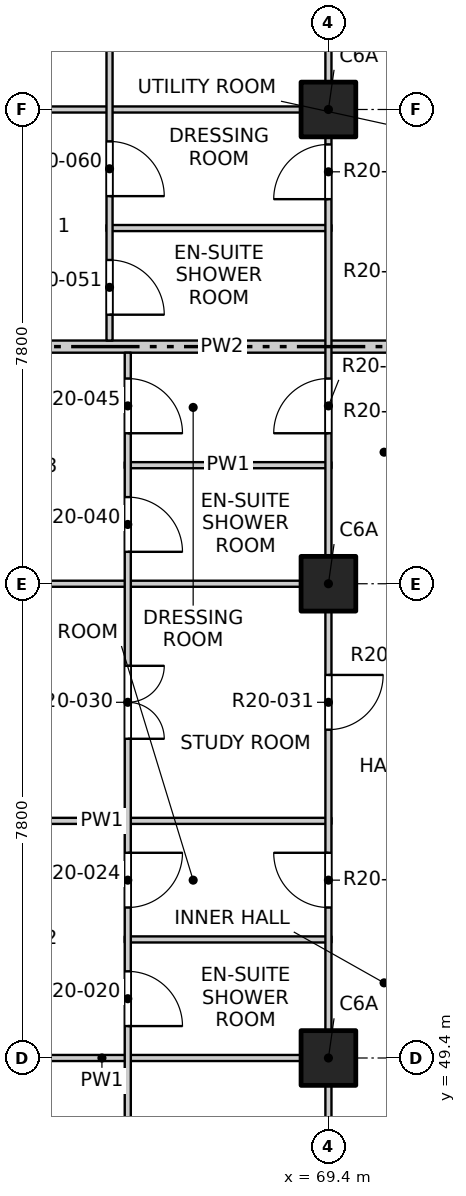
"""IFC4 building model, lengths in metres.
Left out: names, types, materials, properties, quantities, classifications, styles, units other than length and angle.
Written with IfcOpenShell. Run it as: python <this file> out.ifc"""

import sys

from ifc_helpers import new_model, si_unit, direction, frame, frame_2d, origin, origin_2d, place, context, subcontext, project, spatial, rectangle, extrude, element, fill, save


model = new_model("IFC4")
c1 = context("Model", 3, precision=1e-05, world=origin(), true_north=direction((0.0, 1.0)))
c2 = subcontext(c1, "Body", "Model", "MODEL_VIEW")
j1 = project(units=[si_unit("LENGTHUNIT", "METRE"), si_unit("PLANEANGLEUNIT", "RADIAN")], contexts=[c1])
p1 = place(None, origin())
s1 = spatial("IfcSite", under=j1, at=p1, CompositionType="ELEMENT")
p2 = place(p1, origin())
s2 = spatial("IfcBuilding", under=s1, at=p2, CompositionType="ELEMENT")
p3 = place(p2, frame((0.0, 0.0, 204.1)))
s3 = spatial("IfcBuildingStorey", under=s2, at=p3, CompositionType="ELEMENT", Elevation=204.1)
for number, where, z_axis, x_axis in (
    (1, (69.4, 49.4, -0.25), (0.0, 0.0, 1.0), (1.0, 0.0, 0.0)),
    (2, (69.4, 57.2, -0.25), (0.0, 0.0, 1.0), (1.0, 0.0, 0.0)),
    (3, (69.4, 65.0, -0.25), (0.0, 0.0, 1.0), (1.0, 0.0, 0.0)),
):
    element("IfcColumn", number, at=place(p3, frame(where, z_axis=z_axis, x_axis=x_axis)), inside=s3, PredefinedType="COLUMN", context=c2, shape_type="SweptSolid", body=[
        extrude(rectangle(XDim=0.9, YDim=0.9, at=origin_2d()), origin(), (0.0, 0.0, 1.0), 3.4),
    ])
p4 = place(p3, frame((61.9, 49.4, 0.0), z_axis=(0.0, 0.0, 1.0), x_axis=(1.0, 0.0, 0.0)))
e4 = element("IfcWall", 4, at=p4, inside=s3, PredefinedType="PARTITIONING", context=c2, shape_type="SweptSolid", body=[
    extrude(rectangle(XDim=7.55, YDim=0.1, at=frame_2d((3.775, 0.0))), origin(), (0.0, 0.0, 1.0), 3.15),
])
p5 = place(p3, frame((66.05, 51.35, 0.0), z_axis=(0.0, 0.0, 1.0), x_axis=(1.0, 0.0, 0.0)))
e5 = element("IfcWall", 5, at=p5, inside=s3, PredefinedType="PARTITIONING", context=c2, shape_type="SweptSolid", body=[
    extrude(rectangle(XDim=3.4, YDim=0.1, at=frame_2d((1.7, 0.0))), origin(), (0.0, 0.0, 1.0), 3.15),
])
for number, where, z_axis, x_axis in (
    (6, (61.9, 53.3, 0.0), (0.0, 0.0, 1.0), (1.0, 0.0, 0.0)),
    (7, (61.9, 57.2, 0.0), (0.0, 0.0, 1.0), (1.0, 0.0, 0.0)),
):
    element("IfcWall", number, at=place(p3, frame(where, z_axis=z_axis, x_axis=x_axis)), inside=s3, PredefinedType="PARTITIONING", context=c2, shape_type="SweptSolid", body=[
        extrude(rectangle(XDim=7.55, YDim=0.1, at=frame_2d((3.775, 0.0))), origin(), (0.0, 0.0, 1.0), 3.15),
    ])
p6 = place(p3, frame((66.05, 59.15, 0.0), z_axis=(0.0, 0.0, 1.0), x_axis=(1.0, 0.0, 0.0)))
e8 = element("IfcWall", 8, at=p6, inside=s3, PredefinedType="PARTITIONING", context=c2, shape_type="SweptSolid", body=[
    extrude(rectangle(XDim=3.4, YDim=0.1, at=frame_2d((1.7, 0.0))), origin(), (0.0, 0.0, 1.0), 3.15),
])
p7 = place(p3, frame((61.9, 61.1, 0.0), z_axis=(0.0, 0.0, 1.0), x_axis=(1.0, 0.0, 0.0)))
e9 = element("IfcWall", 9, at=p7, inside=s3, PredefinedType="PARTITIONING", context=c2, shape_type="SweptSolid", body=[
    extrude(rectangle(XDim=11.5, YDim=0.2, at=frame_2d((5.75, 0.0))), origin(), (0.0, 0.0, 1.0), 2.55),
])
p8 = place(p3, frame((65.75, 63.05, 0.0), z_axis=(0.0, 0.0, 1.0), x_axis=(1.0, 0.0, 0.0)))
e10 = element("IfcWall", 10, at=p8, inside=s3, PredefinedType="PARTITIONING", context=c2, shape_type="SweptSolid", body=[
    extrude(rectangle(XDim=3.7, YDim=0.1, at=frame_2d((1.85, 0.0))), origin(), (0.0, 0.0, 1.0), 3.15),
])
p9 = place(p3, frame((61.9, 65.0, 0.0), z_axis=(0.0, 0.0, 1.0), x_axis=(1.0, 0.0, 0.0)))
e11 = element("IfcWall", 11, at=p9, inside=s3, PredefinedType="PARTITIONING", context=c2, shape_type="SweptSolid", body=[
    extrude(rectangle(XDim=7.55, YDim=0.1, at=frame_2d((3.775, 0.0))), origin(), (0.0, 0.0, 1.0), 3.15),
])
p10 = place(p3, frame((65.8, 61.2, 0.0), z_axis=(0.0, 0.0, 1.0), x_axis=(0.0, 1.0, 0.0)))
e12 = element("IfcWall", 12, at=p10, inside=s3, PredefinedType="PARTITIONING", context=c2, shape_type="SweptSolid", body=[
    extrude(rectangle(XDim=26.9, YDim=0.1, at=frame_2d((13.45, 0.0))), origin(), (0.0, 0.0, 1.0), 3.15),
])
p11 = place(p10, frame((0.425, 0.0, 0.0)))
e13 = element("IfcOpeningElement", 13, at=p11, cuts=e12, PredefinedType="OPENING", context=c2, shape_type="SweptSolid", body=[
    extrude(rectangle(XDim=0.9, YDim=2.1, at=frame_2d((0.45, 1.05))), frame((0.0, 0.06, 0.0), z_axis=(0.0, -1.0, 0.0), x_axis=(1.0, 0.0, 0.0)), (0.0, 0.0, 1.0), 0.12),
])
p12 = place(p10, frame((2.375, 0.0, 0.0)))
e14 = element("IfcOpeningElement", 14, at=p12, cuts=e12, PredefinedType="OPENING", context=c2, shape_type="SweptSolid", body=[
    extrude(rectangle(XDim=0.9, YDim=2.1, at=frame_2d((0.45, 1.05))), frame((0.0, 0.06, 0.0), z_axis=(0.0, -1.0, 0.0), x_axis=(1.0, 0.0, 0.0)), (0.0, 0.0, 1.0), 0.12),
])
p13 = place(p10, frame((5.15, 0.0, 0.0)))
e15 = element("IfcOpeningElement", 15, at=p13, cuts=e12, PredefinedType="OPENING", context=c2, shape_type="SweptSolid", body=[
    extrude(rectangle(XDim=1.2, YDim=2.1, at=frame_2d((0.6, 1.05))), frame((0.0, 0.06, 0.0), z_axis=(0.0, -1.0, 0.0), x_axis=(1.0, 0.0, 0.0)), (0.0, 0.0, 1.0), 0.12),
])
p14 = place(p10, frame((9.05, 0.0, 0.0)))
e16 = element("IfcOpeningElement", 16, at=p14, cuts=e12, PredefinedType="OPENING", context=c2, shape_type="SweptSolid", body=[
    extrude(rectangle(XDim=1.2, YDim=2.1, at=frame_2d((0.6, 1.05))), frame((0.0, 0.06, 0.0), z_axis=(0.0, -1.0, 0.0), x_axis=(1.0, 0.0, 0.0)), (0.0, 0.0, 1.0), 0.12),
])
p15 = place(p10, frame((12.125, 0.0, 0.0)))
e17 = element("IfcOpeningElement", 17, at=p15, cuts=e12, PredefinedType="OPENING", context=c2, shape_type="SweptSolid", body=[
    extrude(rectangle(XDim=0.9, YDim=2.1, at=frame_2d((0.45, 1.05))), frame((0.0, 0.06, 0.0), z_axis=(0.0, -1.0, 0.0), x_axis=(1.0, 0.0, 0.0)), (0.0, 0.0, 1.0), 0.12),
])
p16 = place(p10, frame((14.075, 0.0, 0.0)))
e18 = element("IfcOpeningElement", 18, at=p16, cuts=e12, PredefinedType="OPENING", context=c2, shape_type="SweptSolid", body=[
    extrude(rectangle(XDim=0.9, YDim=2.1, at=frame_2d((0.45, 1.05))), frame((0.0, 0.06, 0.0), z_axis=(0.0, -1.0, 0.0), x_axis=(1.0, 0.0, 0.0)), (0.0, 0.0, 1.0), 0.12),
])
p17 = place(p10, frame((16.025, 0.0, 0.0)))
e19 = element("IfcOpeningElement", 19, at=p17, cuts=e12, PredefinedType="OPENING", context=c2, shape_type="SweptSolid", body=[
    extrude(rectangle(XDim=0.9, YDim=2.1, at=frame_2d((0.45, 1.05))), frame((0.0, 0.06, 0.0), z_axis=(0.0, -1.0, 0.0), x_axis=(1.0, 0.0, 0.0)), (0.0, 0.0, 1.0), 0.12),
])
p18 = place(p10, frame((17.975, 0.0, 0.0)))
e20 = element("IfcOpeningElement", 20, at=p18, cuts=e12, PredefinedType="OPENING", context=c2, shape_type="SweptSolid", body=[
    extrude(rectangle(XDim=0.9, YDim=2.1, at=frame_2d((0.45, 1.05))), frame((0.0, 0.06, 0.0), z_axis=(0.0, -1.0, 0.0), x_axis=(1.0, 0.0, 0.0)), (0.0, 0.0, 1.0), 0.12),
])
p19 = place(p10, frame((20.75, 0.0, 0.0)))
e21 = element("IfcOpeningElement", 21, at=p19, cuts=e12, PredefinedType="OPENING", context=c2, shape_type="SweptSolid", body=[
    extrude(rectangle(XDim=1.2, YDim=2.1, at=frame_2d((0.6, 1.05))), frame((0.0, 0.06, 0.0), z_axis=(0.0, -1.0, 0.0), x_axis=(1.0, 0.0, 0.0)), (0.0, 0.0, 1.0), 0.12),
])
p20 = place(p10, frame((24.65, 0.0, 0.0)))
e22 = element("IfcOpeningElement", 22, at=p20, cuts=e12, PredefinedType="OPENING", context=c2, shape_type="SweptSolid", body=[
    extrude(rectangle(XDim=1.2, YDim=2.1, at=frame_2d((0.6, 1.05))), frame((0.0, 0.06, 0.0), z_axis=(0.0, -1.0, 0.0), x_axis=(1.0, 0.0, 0.0)), (0.0, 0.0, 1.0), 0.12),
])
p21 = place(p3, frame((66.1, 41.9, 0.0), z_axis=(0.0, 0.0, 1.0), x_axis=(0.0, 1.0, 0.0)))
e23 = element("IfcWall", 23, at=p21, inside=s3, PredefinedType="PARTITIONING", context=c2, shape_type="SweptSolid", body=[
    extrude(rectangle(XDim=19.1, YDim=0.1, at=frame_2d((9.55, 0.0))), origin(), (0.0, 0.0, 1.0), 3.15),
])
p22 = place(p21, frame((1.05, 0.0, 0.0)))
e24 = element("IfcOpeningElement", 24, at=p22, cuts=e23, PredefinedType="OPENING", context=c2, shape_type="SweptSolid", body=[
    extrude(rectangle(XDim=1.2, YDim=2.1, at=frame_2d((0.6, 1.05))), frame((0.0, 0.06, 0.0), z_axis=(0.0, -1.0, 0.0), x_axis=(1.0, 0.0, 0.0)), (0.0, 0.0, 1.0), 0.12),
])
p23 = place(p21, frame((4.95, 0.0, 0.0)))
e25 = element("IfcOpeningElement", 25, at=p23, cuts=e23, PredefinedType="OPENING", context=c2, shape_type="SweptSolid", body=[
    extrude(rectangle(XDim=1.2, YDim=2.1, at=frame_2d((0.6, 1.05))), frame((0.0, 0.06, 0.0), z_axis=(0.0, -1.0, 0.0), x_axis=(1.0, 0.0, 0.0)), (0.0, 0.0, 1.0), 0.12),
])
p24 = place(p21, frame((8.025, 0.0, 0.0)))
e26 = element("IfcOpeningElement", 26, at=p24, cuts=e23, PredefinedType="OPENING", context=c2, shape_type="SweptSolid", body=[
    extrude(rectangle(XDim=0.9, YDim=2.1, at=frame_2d((0.45, 1.05))), frame((0.0, 0.06, 0.0), z_axis=(0.0, -1.0, 0.0), x_axis=(1.0, 0.0, 0.0)), (0.0, 0.0, 1.0), 0.12),
])
p25 = place(p21, frame((9.975, 0.0, 0.0)))
e27 = element("IfcOpeningElement", 27, at=p25, cuts=e23, PredefinedType="OPENING", context=c2, shape_type="SweptSolid", body=[
    extrude(rectangle(XDim=0.9, YDim=2.1, at=frame_2d((0.45, 1.05))), frame((0.0, 0.06, 0.0), z_axis=(0.0, -1.0, 0.0), x_axis=(1.0, 0.0, 0.0)), (0.0, 0.0, 1.0), 0.12),
])
p26 = place(p21, frame((12.75, 0.0, 0.0)))
e28 = element("IfcOpeningElement", 28, at=p26, cuts=e23, PredefinedType="OPENING", context=c2, shape_type="SweptSolid", body=[
    extrude(rectangle(XDim=1.2, YDim=2.1, at=frame_2d((0.6, 1.05))), frame((0.0, 0.06, 0.0), z_axis=(0.0, -1.0, 0.0), x_axis=(1.0, 0.0, 0.0)), (0.0, 0.0, 1.0), 0.12),
])
p27 = place(p21, frame((15.825, 0.0, 0.0)))
e29 = element("IfcOpeningElement", 29, at=p27, cuts=e23, PredefinedType="OPENING", context=c2, shape_type="SweptSolid", body=[
    extrude(rectangle(XDim=0.9, YDim=2.1, at=frame_2d((0.45, 1.05))), frame((0.0, 0.06, 0.0), z_axis=(0.0, -1.0, 0.0), x_axis=(1.0, 0.0, 0.0)), (0.0, 0.0, 1.0), 0.12),
])
p28 = place(p21, frame((17.775, 0.0, 0.0)))
e30 = element("IfcOpeningElement", 30, at=p28, cuts=e23, PredefinedType="OPENING", context=c2, shape_type="SweptSolid", body=[
    extrude(rectangle(XDim=0.9, YDim=2.1, at=frame_2d((0.45, 1.05))), frame((0.0, 0.06, 0.0), z_axis=(0.0, -1.0, 0.0), x_axis=(1.0, 0.0, 0.0)), (0.0, 0.0, 1.0), 0.12),
])
p29 = place(p3, frame((69.4, 41.9, 0.0), z_axis=(0.0, 0.0, 1.0), x_axis=(0.0, 1.0, 0.0)))
e31 = element("IfcWall", 31, at=p29, inside=s3, PredefinedType="PARTITIONING", context=c2, shape_type="SweptSolid", body=[
    extrude(rectangle(XDim=46.2, YDim=0.1, at=frame_2d((23.1, 0.0))), origin(), (0.0, 0.0, 1.0), 3.15),
])
p30 = place(p29, frame((1.2, 0.0, 0.0)))
e32 = element("IfcOpeningElement", 32, at=p30, cuts=e31, PredefinedType="OPENING", context=c2, shape_type="SweptSolid", body=[
    extrude(rectangle(XDim=0.9, YDim=2.1, at=frame_2d((0.45, 1.05))), frame((0.0, 0.06, 0.0), z_axis=(0.0, -1.0, 0.0), x_axis=(1.0, 0.0, 0.0)), (0.0, 0.0, 1.0), 0.12),
])
p31 = place(p29, frame((5.1, 0.0, 0.0)))
e33 = element("IfcOpeningElement", 33, at=p31, cuts=e31, PredefinedType="OPENING", context=c2, shape_type="SweptSolid", body=[
    extrude(rectangle(XDim=0.9, YDim=2.1, at=frame_2d((0.45, 1.05))), frame((0.0, 0.06, 0.0), z_axis=(0.0, -1.0, 0.0), x_axis=(1.0, 0.0, 0.0)), (0.0, 0.0, 1.0), 0.12),
])
p32 = place(p29, frame((9.975, 0.0, 0.0)))
e34 = element("IfcOpeningElement", 34, at=p32, cuts=e31, PredefinedType="OPENING", context=c2, shape_type="SweptSolid", body=[
    extrude(rectangle(XDim=0.9, YDim=2.1, at=frame_2d((0.45, 1.05))), frame((0.0, 0.06, 0.0), z_axis=(0.0, -1.0, 0.0), x_axis=(1.0, 0.0, 0.0)), (0.0, 0.0, 1.0), 0.12),
])
p33 = place(p29, frame((12.9, 0.0, 0.0)))
e35 = element("IfcOpeningElement", 35, at=p33, cuts=e31, PredefinedType="OPENING", context=c2, shape_type="SweptSolid", body=[
    extrude(rectangle(XDim=0.9, YDim=2.1, at=frame_2d((0.45, 1.05))), frame((0.0, 0.06, 0.0), z_axis=(0.0, -1.0, 0.0), x_axis=(1.0, 0.0, 0.0)), (0.0, 0.0, 1.0), 0.12),
])
p34 = place(p29, frame((17.775, 0.0, 0.0)))
e36 = element("IfcOpeningElement", 36, at=p34, cuts=e31, PredefinedType="OPENING", context=c2, shape_type="SweptSolid", body=[
    extrude(rectangle(XDim=0.9, YDim=2.1, at=frame_2d((0.45, 1.05))), frame((0.0, 0.06, 0.0), z_axis=(0.0, -1.0, 0.0), x_axis=(1.0, 0.0, 0.0)), (0.0, 0.0, 1.0), 0.12),
])
p35 = place(p29, frame((21.625, 0.0, 0.0)))
e37 = element("IfcOpeningElement", 37, at=p35, cuts=e31, PredefinedType="OPENING", context=c2, shape_type="SweptSolid", body=[
    extrude(rectangle(XDim=0.9, YDim=2.1, at=frame_2d((0.45, 1.05))), frame((0.0, 0.06, 0.0), z_axis=(0.0, -1.0, 0.0), x_axis=(1.0, 0.0, 0.0)), (0.0, 0.0, 1.0), 0.12),
])
p36 = place(p29, frame((24.6, 0.0, 0.0)))
e38 = element("IfcOpeningElement", 38, at=p36, cuts=e31, PredefinedType="OPENING", context=c2, shape_type="SweptSolid", body=[
    extrude(rectangle(XDim=0.9, YDim=2.1, at=frame_2d((0.45, 1.05))), frame((0.0, 0.06, 0.0), z_axis=(0.0, -1.0, 0.0), x_axis=(1.0, 0.0, 0.0)), (0.0, 0.0, 1.0), 0.12),
])
p37 = place(p29, frame((28.5, 0.0, 0.0)))
e39 = element("IfcOpeningElement", 39, at=p37, cuts=e31, PredefinedType="OPENING", context=c2, shape_type="SweptSolid", body=[
    extrude(rectangle(XDim=0.9, YDim=2.1, at=frame_2d((0.45, 1.05))), frame((0.0, 0.06, 0.0), z_axis=(0.0, -1.0, 0.0), x_axis=(1.0, 0.0, 0.0)), (0.0, 0.0, 1.0), 0.12),
])
p38 = place(p29, frame((33.375, 0.0, 0.0)))
e40 = element("IfcOpeningElement", 40, at=p38, cuts=e31, PredefinedType="OPENING", context=c2, shape_type="SweptSolid", body=[
    extrude(rectangle(XDim=0.9, YDim=2.1, at=frame_2d((0.45, 1.05))), frame((0.0, 0.06, 0.0), z_axis=(0.0, -1.0, 0.0), x_axis=(1.0, 0.0, 0.0)), (0.0, 0.0, 1.0), 0.12),
])
p39 = place(p29, frame((37.225, 0.0, 0.0)))
e41 = element("IfcOpeningElement", 41, at=p39, cuts=e31, PredefinedType="OPENING", context=c2, shape_type="SweptSolid", body=[
    extrude(rectangle(XDim=0.9, YDim=2.1, at=frame_2d((0.45, 1.05))), frame((0.0, 0.06, 0.0), z_axis=(0.0, -1.0, 0.0), x_axis=(1.0, 0.0, 0.0)), (0.0, 0.0, 1.0), 0.12),
])
p40 = place(p29, frame((40.2, 0.0, 0.0)))
e42 = element("IfcOpeningElement", 42, at=p40, cuts=e31, PredefinedType="OPENING", context=c2, shape_type="SweptSolid", body=[
    extrude(rectangle(XDim=0.9, YDim=2.1, at=frame_2d((0.45, 1.05))), frame((0.0, 0.06, 0.0), z_axis=(0.0, -1.0, 0.0), x_axis=(1.0, 0.0, 0.0)), (0.0, 0.0, 1.0), 0.12),
])
p41 = place(p29, frame((44.1, 0.0, 0.0)))
e43 = element("IfcOpeningElement", 43, at=p41, cuts=e31, PredefinedType="OPENING", context=c2, shape_type="SweptSolid", body=[
    extrude(rectangle(XDim=0.9, YDim=2.1, at=frame_2d((0.45, 1.05))), frame((0.0, 0.06, 0.0), z_axis=(0.0, -1.0, 0.0), x_axis=(1.0, 0.0, 0.0)), (0.0, 0.0, 1.0), 0.12),
])
p42 = place(p24, origin())
e44 = element("IfcDoor", 44, at=p42, inside=s3, OperationType="SINGLE_SWING_RIGHT", PredefinedType="DOOR", context=c2, shape_type="SweptSolid", body=[
    extrude(rectangle(XDim=0.9, YDim=2.1, at=frame_2d((0.45, 1.05))), frame((0.0, 0.025, 0.0), z_axis=(0.0, -1.0, 0.0), x_axis=(1.0, 0.0, 0.0)), (0.0, 0.0, 1.0), 0.05),
])
fill(e26, e44)
p43 = place(p25, origin())
e45 = element("IfcDoor", 45, at=p43, inside=s3, OperationType="SINGLE_SWING_LEFT", PredefinedType="DOOR", context=c2, shape_type="SweptSolid", body=[
    extrude(rectangle(XDim=0.9, YDim=2.1, at=frame_2d((0.45, 1.05))), frame((0.0, 0.025, 0.0), z_axis=(0.0, -1.0, 0.0), x_axis=(1.0, 0.0, 0.0)), (0.0, 0.0, 1.0), 0.05),
])
fill(e27, e45)
p44 = place(p32, origin())
e46 = element("IfcDoor", 46, at=p44, inside=s3, OperationType="SINGLE_SWING_RIGHT", PredefinedType="DOOR", context=c2, shape_type="SweptSolid", body=[
    extrude(rectangle(XDim=0.9, YDim=2.1, at=frame_2d((0.45, 1.05))), frame((0.0, 0.025, 0.0), z_axis=(0.0, -1.0, 0.0), x_axis=(1.0, 0.0, 0.0)), (0.0, 0.0, 1.0), 0.05),
])
fill(e34, e46)
p45 = place(p26, origin())
e47 = element("IfcDoor", 47, at=p45, inside=s3, OperationType="DOUBLE_DOOR_SINGLE_SWING", PredefinedType="DOOR", context=c2, shape_type="SweptSolid", body=[
    extrude(rectangle(XDim=1.2, YDim=2.1, at=frame_2d((0.6, 1.05))), frame((0.0, 0.025, 0.0), z_axis=(0.0, -1.0, 0.0), x_axis=(1.0, 0.0, 0.0)), (0.0, 0.0, 1.0), 0.05),
])
fill(e28, e47)
p46 = place(p33, origin())
e48 = element("IfcDoor", 48, at=p46, inside=s3, OperationType="SINGLE_SWING_LEFT", PredefinedType="DOOR", context=c2, shape_type="SweptSolid", body=[
    extrude(rectangle(XDim=0.9, YDim=2.1, at=frame_2d((0.45, 1.05))), frame((0.0, 0.025, 0.0), z_axis=(0.0, -1.0, 0.0), x_axis=(1.0, 0.0, 0.0)), (0.0, 0.0, 1.0), 0.05),
])
fill(e35, e48)
p47 = place(p27, origin())
e49 = element("IfcDoor", 49, at=p47, inside=s3, OperationType="SINGLE_SWING_RIGHT", PredefinedType="DOOR", context=c2, shape_type="SweptSolid", body=[
    extrude(rectangle(XDim=0.9, YDim=2.1, at=frame_2d((0.45, 1.05))), frame((0.0, 0.025, 0.0), z_axis=(0.0, -1.0, 0.0), x_axis=(1.0, 0.0, 0.0)), (0.0, 0.0, 1.0), 0.05),
])
fill(e29, e49)
p48 = place(p28, origin())
e50 = element("IfcDoor", 50, at=p48, inside=s3, OperationType="SINGLE_SWING_RIGHT", PredefinedType="DOOR", context=c2, shape_type="SweptSolid", body=[
    extrude(rectangle(XDim=0.9, YDim=2.1, at=frame_2d((0.45, 1.05))), frame((0.0, 0.025, 0.0), z_axis=(0.0, -1.0, 0.0), x_axis=(1.0, 0.0, 0.0)), (0.0, 0.0, 1.0), 0.05),
])
fill(e30, e50)
p49 = place(p34, origin())
e51 = element("IfcDoor", 51, at=p49, inside=s3, OperationType="SINGLE_SWING_LEFT", PredefinedType="DOOR", context=c2, shape_type="SweptSolid", body=[
    extrude(rectangle(XDim=0.9, YDim=2.1, at=frame_2d((0.45, 1.05))), frame((0.0, 0.025, 0.0), z_axis=(0.0, -1.0, 0.0), x_axis=(1.0, 0.0, 0.0)), (0.0, 0.0, 1.0), 0.05),
])
fill(e36, e51)
p50 = place(p11, origin())
e52 = element("IfcDoor", 52, at=p50, inside=s3, OperationType="SINGLE_SWING_RIGHT", PredefinedType="DOOR", context=c2, shape_type="SweptSolid", body=[
    extrude(rectangle(XDim=0.9, YDim=2.1, at=frame_2d((0.45, 1.05))), frame((0.0, 0.025, 0.0), z_axis=(0.0, -1.0, 0.0), x_axis=(1.0, 0.0, 0.0)), (0.0, 0.0, 1.0), 0.05),
])
fill(e13, e52)
p51 = place(p35, origin())
e53 = element("IfcDoor", 53, at=p51, inside=s3, OperationType="SINGLE_SWING_LEFT", PredefinedType="DOOR", context=c2, shape_type="SweptSolid", body=[
    extrude(rectangle(XDim=0.9, YDim=2.1, at=frame_2d((0.45, 1.05))), frame((0.0, 0.025, 0.0), z_axis=(0.0, -1.0, 0.0), x_axis=(1.0, 0.0, 0.0)), (0.0, 0.0, 1.0), 0.05),
])
fill(e37, e53)
p52 = place(p12, origin())
e54 = element("IfcDoor", 54, at=p52, inside=s3, OperationType="SINGLE_SWING_RIGHT", PredefinedType="DOOR", context=c2, shape_type="SweptSolid", body=[
    extrude(rectangle(XDim=0.9, YDim=2.1, at=frame_2d((0.45, 1.05))), frame((0.0, 0.025, 0.0), z_axis=(0.0, -1.0, 0.0), x_axis=(1.0, 0.0, 0.0)), (0.0, 0.0, 1.0), 0.05),
])
fill(e14, e54)
save(model, sys.argv[1])
